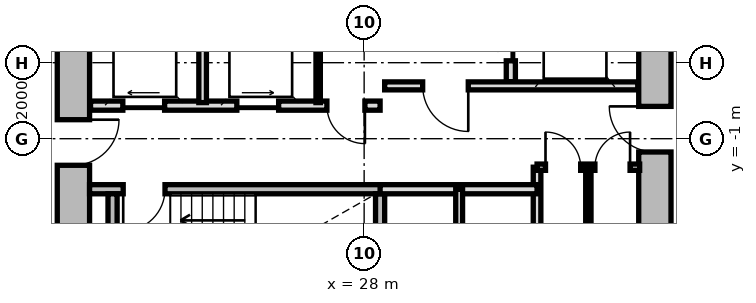
"""IFC4 building model, lengths in metres.
Left out: names, types, materials, properties, quantities, classifications, styles, units other than length and angle.
Written with IfcOpenShell. Run it as: python <this file> out.ifc"""

import sys

from ifc_helpers import new_model, si_unit, direction, frame, frame_2d, origin, place, context, subcontext, project, spatial, rectangle, extrude, source, transform, mapped, element, fill, save


model = new_model("IFC4")
c1 = context("Model", 3, precision=1e-05, world=origin(), true_north=direction((0.0, 1.0)))
c2 = subcontext(c1, "Body", "Model", "MODEL_VIEW")
j1 = project(units=[si_unit("LENGTHUNIT", "METRE"), si_unit("PLANEANGLEUNIT", "RADIAN")], contexts=[c1])
p1 = place(None, origin())
s1 = spatial("IfcSite", under=j1, at=p1, CompositionType="ELEMENT")
p2 = place(p1, origin())
s2 = spatial("IfcBuilding", under=s1, at=p2, CompositionType="ELEMENT")
p3 = place(p2, frame((0.0, 0.0, 33.8)))
s3 = spatial("IfcBuildingStorey", under=s2, at=p3, CompositionType="ELEMENT", Elevation=33.8)
m1 = source(origin(), c2, "Body", "SweptSolid", [
    extrude(rectangle(XDim=11.0, YDim=0.85, at=frame_2d((5.5, 0.0))), origin(), (0.0, 0.0, 1.0), 2.79),
])
p4 = place(p3, frame((20.35, -5.5, 0.0), z_axis=(0.0, 0.0, 1.0), x_axis=(0.0, 1.0, 0.0)))
e1 = element("IfcWall", 1, at=p4, inside=s3, PredefinedType="SHEAR", context=c2, shape_type="MappedRepresentation", body=[
    mapped(m1, transform((0.0, 0.0, 0.0), x_axis=(1.0, 0.0, 0.0), y_axis=(0.0, 1.0, 0.0), z_axis=(0.0, 0.0, 1.0), scale=1.0)),
])
p5 = place(p4, frame((3.8, 0.0, 0.0)))
e2 = element("IfcOpeningElement", 2, at=p5, cuts=e1, PredefinedType="OPENING", context=c2, shape_type="SweptSolid", body=[
    extrude(rectangle(XDim=1.2, YDim=2.15, at=frame_2d((0.6, 1.075))), frame((0.0, 0.435, 0.0), z_axis=(0.0, -1.0, 0.0), x_axis=(1.0, 0.0, 0.0)), (0.0, 0.0, 1.0), 0.87),
])
p6 = place(p3, frame((35.65, 5.5, 0.0), z_axis=(0.0, 0.0, 1.0), x_axis=(0.0, -1.0, 0.0)))
e3 = element("IfcWall", 3, at=p6, inside=s3, PredefinedType="SHEAR", context=c2, shape_type="MappedRepresentation", body=[
    mapped(m1, transform((0.0, 0.0, 0.0), x_axis=(1.0, 0.0, 0.0), y_axis=(0.0, 1.0, 0.0), z_axis=(0.0, 0.0, 1.0), scale=1.0)),
])
p7 = place(p6, frame((5.65, 0.0, 0.0)))
e4 = element("IfcOpeningElement", 4, at=p7, cuts=e3, PredefinedType="OPENING", context=c2, shape_type="SweptSolid", body=[
    extrude(rectangle(XDim=1.2, YDim=2.15, at=frame_2d((0.6, 1.075))), frame((0.0, 0.435, 0.0), z_axis=(0.0, -1.0, 0.0), x_axis=(1.0, 0.0, 0.0)), (0.0, 0.0, 1.0), 0.87),
])
m2 = source(origin(), c2, "Body", "SweptSolid", [
    extrude(rectangle(XDim=7.765, YDim=0.24, at=frame_2d((3.883, 0.0))), origin(), (0.0, 0.0, 1.0), 2.79),
])
p8 = place(p3, frame((20.775, -2.33, 0.0), z_axis=(0.0, 0.0, 1.0), x_axis=(1.0, 0.0, 0.0)))
e5 = element("IfcWall", 5, at=p8, inside=s3, PredefinedType="PARTITIONING", context=c2, shape_type="MappedRepresentation", body=[
    mapped(m2, transform((0.0, 0.0, 0.0), x_axis=(1.0, 0.0, 0.0), y_axis=(0.0, 1.0, 0.0), z_axis=(0.0, 0.0, 1.0), scale=1.0)),
])
p9 = place(p8, frame((0.885, 0.0, 0.0)))
e6 = element("IfcOpeningElement", 6, at=p9, cuts=e5, PredefinedType="OPENING", context=c2, shape_type="SweptSolid", body=[
    extrude(rectangle(XDim=1.1, YDim=2.15, at=frame_2d((0.55, 1.075))), frame((0.0, 0.13, 0.0), z_axis=(0.0, -1.0, 0.0), x_axis=(1.0, 0.0, 0.0)), (0.0, 0.0, 1.0), 0.26),
])
m3 = source(origin(), c2, "Body", "SweptSolid", [
    extrude(rectangle(XDim=3.075, YDim=0.24, at=frame_2d((1.538, 0.0))), origin(), (0.0, 0.0, 1.0), 2.79),
])
for number, where, z_axis, x_axis in (
    (7, (21.38, -5.525, 0.0), (0.0, 0.0, 1.0), (0.0, 1.0, 0.0)),
    (8, (28.42, -5.525, 0.0), (0.0, 0.0, 1.0), (0.0, 1.0, 0.0)),
):
    element("IfcWall", number, at=place(p3, frame(where, z_axis=z_axis, x_axis=x_axis)), inside=s3, PredefinedType="PARTITIONING", context=c2, shape_type="MappedRepresentation", body=[
        mapped(m3, transform((0.0, 0.0, 0.0), x_axis=(1.0, 0.0, 0.0), y_axis=(0.0, 1.0, 0.0), z_axis=(0.0, 0.0, 1.0), scale=1.0)),
    ])
m4 = source(origin(), c2, "Body", "SweptSolid", [
    extrude(rectangle(XDim=5.0, YDim=0.24, at=frame_2d((2.5, 0.0))), origin(), (0.0, 0.0, 1.0), 2.775),
])
p10 = place(p3, frame((31.86, 0.5, 0.0), z_axis=(0.0, 0.0, 1.0), x_axis=(0.0, 1.0, 0.0)))
e9 = element("IfcWall", 9, at=p10, inside=s3, PredefinedType="PARTITIONING", context=c2, shape_type="MappedRepresentation", body=[
    mapped(m4, transform((0.0, 0.0, 0.0), x_axis=(1.0, 0.0, 0.0), y_axis=(0.0, 1.0, 0.0), z_axis=(0.0, 0.0, 1.0), scale=1.0)),
])
p11 = place(p10, frame((3.05, 0.0, 0.0)))
e10 = element("IfcOpeningElement", 10, at=p11, cuts=e9, PredefinedType="OPENING", context=c2, shape_type="SweptSolid", body=[
    extrude(rectangle(XDim=1.3, YDim=2.2, at=frame_2d((0.65, 1.1))), frame((0.0, 0.13, 0.0), z_axis=(0.0, -1.0, 0.0), x_axis=(1.0, 0.0, 0.0)), (0.0, 0.0, 1.0), 0.26),
])
p12 = place(p10, frame((0.55, 0.0, 0.0)))
e11 = element("IfcOpeningElement", 11, at=p12, cuts=e9, PredefinedType="OPENING", context=c2, shape_type="SweptSolid", body=[
    extrude(rectangle(XDim=1.3, YDim=2.2, at=frame_2d((0.65, 1.1))), frame((0.0, 0.13, 0.0), z_axis=(0.0, -1.0, 0.0), x_axis=(1.0, 0.0, 0.0)), (0.0, 0.0, 1.0), 0.26),
])
m5 = source(origin(), c2, "Body", "SweptSolid", [
    extrude(rectangle(XDim=6.66, YDim=0.21, at=frame_2d((3.33, 0.0))), origin(), (0.0, 0.0, 1.0), 2.775),
])
p13 = place(p3, frame((28.54, 0.39, 0.0), z_axis=(0.0, 0.0, 1.0), x_axis=(1.0, 0.0, 0.0)))
e12 = element("IfcWall", 12, at=p13, inside=s3, PredefinedType="PARTITIONING", context=c2, shape_type="MappedRepresentation", body=[
    mapped(m5, transform((0.0, 0.0, 0.0), x_axis=(1.0, 0.0, 0.0), y_axis=(0.0, 1.0, 0.0), z_axis=(0.0, 0.0, 1.0), scale=1.0)),
])
p14 = place(p13, frame((1.0, 0.0, 0.0)))
e13 = element("IfcOpeningElement", 13, at=p14, cuts=e12, PredefinedType="OPENING", context=c2, shape_type="SweptSolid", body=[
    extrude(rectangle(XDim=1.2, YDim=2.15, at=frame_2d((0.6, 1.075))), frame((0.0, 0.115, 0.0), z_axis=(0.0, -1.0, 0.0), x_axis=(1.0, 0.0, 0.0)), (0.0, 0.0, 1.0), 0.23),
])
m6 = source(origin(), c2, "Body", "SweptSolid", [
    extrude(rectangle(XDim=7.62, YDim=0.24, at=frame_2d((3.81, 0.0))), origin(), (0.0, 0.0, 1.0), 2.775),
])
p15 = place(p3, frame((20.8, -0.13, 0.0), z_axis=(0.0, 0.0, 1.0), x_axis=(1.0, 0.0, 0.0)))
e14 = element("IfcWall", 14, at=p15, inside=s3, PredefinedType="PARTITIONING", context=c2, shape_type="MappedRepresentation", body=[
    mapped(m6, transform((0.0, 0.0, 0.0), x_axis=(1.0, 0.0, 0.0), y_axis=(0.0, 1.0, 0.0), z_axis=(0.0, 0.0, 1.0), scale=1.0)),
])
p16 = place(p15, frame((6.22, 0.0, 0.0)))
e15 = element("IfcOpeningElement", 15, at=p16, cuts=e14, PredefinedType="OPENING", context=c2, shape_type="SweptSolid", body=[
    extrude(rectangle(XDim=1.0, YDim=2.1, at=frame_2d((0.5, 1.05))), frame((0.0, 0.13, 0.0), z_axis=(0.0, -1.0, 0.0), x_axis=(1.0, 0.0, 0.0)), (0.0, 0.0, 1.0), 0.26),
])
p17 = place(p15, frame((0.85, 0.0, 0.0)))
e16 = element("IfcOpeningElement", 16, at=p17, cuts=e14, PredefinedType="OPENING", context=c2, shape_type="SweptSolid", body=[
    extrude(rectangle(XDim=1.1, YDim=2.2, at=frame_2d((0.55, 1.1))), frame((0.0, 0.13, 0.0), z_axis=(0.0, -1.0, 0.0), x_axis=(1.0, 0.0, 0.0)), (0.0, 0.0, 1.0), 0.26),
])
p18 = place(p15, frame((3.85, 0.0, 0.0)))
e17 = element("IfcOpeningElement", 17, at=p18, cuts=e14, PredefinedType="OPENING", context=c2, shape_type="SweptSolid", body=[
    extrude(rectangle(XDim=1.1, YDim=2.2, at=frame_2d((0.55, 1.1))), frame((0.0, 0.13, 0.0), z_axis=(0.0, -1.0, 0.0), x_axis=(1.0, 0.0, 0.0)), (0.0, 0.0, 1.0), 0.26),
])
m7 = source(origin(), c2, "Body", "SweptSolid", [
    extrude(rectangle(XDim=2.33, YDim=0.115, at=frame_2d((1.165, 0.0))), origin(), (0.0, 0.0, 1.0), 2.775),
])
p19 = place(p3, frame((26.79, -0.05, 0.0), z_axis=(0.0, 0.0, 1.0), x_axis=(0.0, 1.0, 0.0)))
e18 = element("IfcWall", 18, at=p19, inside=s3, PredefinedType="PARTITIONING", context=c2, shape_type="MappedRepresentation", body=[
    mapped(m7, transform((0.0, 0.0, 0.0), x_axis=(1.0, 0.0, 0.0), y_axis=(0.0, 1.0, 0.0), z_axis=(0.0, 0.0, 1.0), scale=1.0)),
])
m8 = source(origin(), c2, "Body", "SweptSolid", [
    extrude(rectangle(XDim=2.33, YDim=0.2, at=frame_2d((1.165, 0.0))), origin(), (0.0, 0.0, 1.0), 2.775),
])
p20 = place(p3, frame((23.75, -0.05, 0.0), z_axis=(0.0, 0.0, 1.0), x_axis=(0.0, 1.0, 0.0)))
e19 = element("IfcWall", 19, at=p20, inside=s3, PredefinedType="PARTITIONING", context=c2, shape_type="MappedRepresentation", body=[
    mapped(m8, transform((0.0, 0.0, 0.0), x_axis=(1.0, 0.0, 0.0), y_axis=(0.0, 1.0, 0.0), z_axis=(0.0, 0.0, 1.0), scale=1.0)),
])
m9 = source(origin(), c2, "Body", "SweptSolid", [
    extrude(rectangle(XDim=3.8, YDim=0.2, at=frame_2d((1.9, 0.0))), origin(), (0.0, 0.0, 1.0), 2.775),
])
p21 = place(p3, frame((32.55, -5.55, 0.0), z_axis=(0.0, 0.0, 1.0), x_axis=(0.0, 1.0, 0.0)))
e20 = element("IfcWall", 20, at=p21, inside=s3, PredefinedType="PARTITIONING", context=c2, shape_type="MappedRepresentation", body=[
    mapped(m9, transform((0.0, 0.0, 0.0), x_axis=(1.0, 0.0, 0.0), y_axis=(0.0, 1.0, 0.0), z_axis=(0.0, 0.0, 1.0), scale=1.0)),
])
m10 = source(origin(), c2, "Body", "SweptSolid", [
    extrude(rectangle(XDim=4.13, YDim=0.24, at=frame_2d((2.065, 0.0))), origin(), (0.0, 0.0, 1.0), 2.775),
])
p22 = place(p3, frame((28.42, -2.33, 0.0), z_axis=(0.0, 0.0, 1.0), x_axis=(1.0, 0.0, 0.0)))
e21 = element("IfcWall", 21, at=p22, inside=s3, PredefinedType="PARTITIONING", context=c2, shape_type="MappedRepresentation", body=[
    mapped(m10, transform((0.0, 0.0, 0.0), x_axis=(1.0, 0.0, 0.0), y_axis=(0.0, 1.0, 0.0), z_axis=(0.0, 0.0, 1.0), scale=1.0)),
])
m11 = source(origin(), c2, "Body", "SweptSolid", [
    extrude(rectangle(XDim=3.22, YDim=0.18, at=frame_2d((1.61, 0.0))), origin(), (0.0, 0.0, 1.0), 2.775),
])
p23 = place(p3, frame((30.5, -5.55, 0.0), z_axis=(0.0, 0.0, 1.0), x_axis=(0.0, 1.0, 0.0)))
e22 = element("IfcWall", 22, at=p23, inside=s3, PredefinedType="PARTITIONING", context=c2, shape_type="MappedRepresentation", body=[
    mapped(m11, transform((0.0, 0.0, 0.0), x_axis=(1.0, 0.0, 0.0), y_axis=(0.0, 1.0, 0.0), z_axis=(0.0, 0.0, 1.0), scale=1.0)),
])
m12 = source(origin(), c2, "Body", "SweptSolid", [
    extrude(rectangle(XDim=2.7, YDim=0.165, at=frame_2d((1.35, 0.0))), origin(), (0.0, 0.0, 1.0), 2.775),
])
p24 = place(p3, frame((32.55, -1.75, 0.0), z_axis=(0.0, 0.0, 1.0), x_axis=(1.0, 0.0, 0.0)))
e23 = element("IfcWall", 23, at=p24, inside=s3, PredefinedType="PARTITIONING", context=c2, shape_type="MappedRepresentation", body=[
    mapped(m12, transform((0.0, 0.0, 0.0), x_axis=(1.0, 0.0, 0.0), y_axis=(0.0, 1.0, 0.0), z_axis=(0.0, 0.0, 1.0), scale=1.0)),
])
p25 = place(p24, frame((0.222, 0.0, 0.0)))
e24 = element("IfcOpeningElement", 24, at=p25, cuts=e23, PredefinedType="OPENING", context=c2, shape_type="SweptSolid", body=[
    extrude(rectangle(XDim=0.925, YDim=2.1, at=frame_2d((0.462, 1.05))), frame((0.0, 0.093, 0.0), z_axis=(0.0, -1.0, 0.0), x_axis=(1.0, 0.0, 0.0)), (0.0, 0.0, 1.0), 0.185),
])
p26 = place(p24, frame((1.522, 0.0, 0.0)))
e25 = element("IfcOpeningElement", 25, at=p26, cuts=e23, PredefinedType="OPENING", context=c2, shape_type="SweptSolid", body=[
    extrude(rectangle(XDim=0.925, YDim=2.1, at=frame_2d((0.462, 1.05))), frame((0.0, 0.093, 0.0), z_axis=(0.0, -1.0, 0.0), x_axis=(1.0, 0.0, 0.0)), (0.0, 0.0, 1.0), 0.185),
])
m13 = source(origin(), c2, "Body", "SweptSolid", [
    extrude(rectangle(XDim=3.8, YDim=0.14, at=frame_2d((1.9, 0.0))), origin(), (0.0, 0.0, 1.0), 2.775),
])
p27 = place(p3, frame((33.9, -5.55, 0.0), z_axis=(0.0, 0.0, 1.0), x_axis=(0.0, 1.0, 0.0)))
e26 = element("IfcWall", 26, at=p27, inside=s3, PredefinedType="PARTITIONING", context=c2, shape_type="MappedRepresentation", body=[
    mapped(m13, transform((0.0, 0.0, 0.0), x_axis=(1.0, 0.0, 0.0), y_axis=(0.0, 1.0, 0.0), z_axis=(0.0, 0.0, 1.0), scale=1.0)),
])
m14 = source(origin(), c2, "Body", "SweptSolid", [
    extrude(rectangle(XDim=1.1, YDim=2.15, at=frame_2d((0.55, 1.075))), frame((0.0, 0.025, 0.0), z_axis=(0.0, -1.0, 0.0), x_axis=(1.0, 0.0, 0.0)), (0.0, 0.0, 1.0), 0.05),
])
p28 = place(p9, frame((1.1, 0.0, 0.0), z_axis=(0.0, 0.0, 1.0), x_axis=(-1.0, 0.0, 0.0)))
e27 = element("IfcDoor", 27, at=p28, inside=s3, OperationType="SINGLE_SWING_RIGHT", PredefinedType="DOOR", context=c2, shape_type="MappedRepresentation", body=[
    mapped(m14, transform((0.0, 0.0, 0.0), x_axis=(1.0, 0.0, 0.0), y_axis=(0.0, 1.0, 0.0), z_axis=(0.0, 0.0, 1.0), scale=1.0)),
])
fill(e6, e27)
m15 = source(origin(), c2, "Body", "SweptSolid", [
    extrude(rectangle(XDim=1.3, YDim=2.2, at=frame_2d((0.65, 1.1))), frame((0.0, 0.025, 0.0), z_axis=(0.0, -1.0, 0.0), x_axis=(1.0, 0.0, 0.0)), (0.0, 0.0, 1.0), 0.05),
])
p29 = place(p12, origin())
e28 = element("IfcDoor", 28, at=p29, inside=s3, OperationType="SLIDING_TO_RIGHT", PredefinedType="DOOR", context=c2, shape_type="MappedRepresentation", body=[
    mapped(m15, transform((0.0, 0.0, 0.0), x_axis=(1.0, 0.0, 0.0), y_axis=(0.0, 1.0, 0.0), z_axis=(0.0, 0.0, 1.0), scale=1.0)),
])
fill(e11, e28)
m16 = source(origin(), c2, "Body", "SweptSolid", [
    extrude(rectangle(XDim=1.2, YDim=2.15, at=frame_2d((0.6, 1.075))), frame((0.0, 0.025, 0.0), z_axis=(0.0, -1.0, 0.0), x_axis=(1.0, 0.0, 0.0)), (0.0, 0.0, 1.0), 0.05),
])
p30 = place(p14, frame((1.2, 0.0, 0.0), z_axis=(0.0, 0.0, 1.0), x_axis=(-1.0, 0.0, 0.0)))
e29 = element("IfcDoor", 29, at=p30, inside=s3, OperationType="SINGLE_SWING_LEFT", PredefinedType="DOOR", context=c2, shape_type="MappedRepresentation", body=[
    mapped(m16, transform((0.0, 0.0, 0.0), x_axis=(1.0, 0.0, 0.0), y_axis=(0.0, 1.0, 0.0), z_axis=(0.0, 0.0, 1.0), scale=1.0)),
])
fill(e13, e29)
p31 = place(p5, frame((1.2, 0.0, 0.0), z_axis=(0.0, 0.0, 1.0), x_axis=(-1.0, 0.0, 0.0)))
e30 = element("IfcDoor", 30, at=p31, inside=s3, OperationType="SINGLE_SWING_LEFT", PredefinedType="DOOR", context=c2, shape_type="MappedRepresentation", body=[
    mapped(m16, transform((0.0, 0.0, 0.0), x_axis=(1.0, 0.0, 0.0), y_axis=(0.0, 1.0, 0.0), z_axis=(0.0, 0.0, 1.0), scale=1.0)),
])
fill(e2, e30)
p32 = place(p7, frame((1.2, 0.0, 0.0), z_axis=(0.0, 0.0, 1.0), x_axis=(-1.0, 0.0, 0.0)))
e31 = element("IfcDoor", 31, at=p32, inside=s3, OperationType="SINGLE_SWING_RIGHT", PredefinedType="DOOR", context=c2, shape_type="MappedRepresentation", body=[
    mapped(m16, transform((0.0, 0.0, 0.0), x_axis=(1.0, 0.0, 0.0), y_axis=(0.0, 1.0, 0.0), z_axis=(0.0, 0.0, 1.0), scale=1.0)),
])
fill(e4, e31)
m17 = source(origin(), c2, "Body", "SweptSolid", [
    extrude(rectangle(XDim=1.0, YDim=2.1, at=frame_2d((0.5, 1.05))), frame((0.0, 0.025, 0.0), z_axis=(0.0, -1.0, 0.0), x_axis=(1.0, 0.0, 0.0)), (0.0, 0.0, 1.0), 0.05),
])
p33 = place(p16, frame((1.0, 0.0, 0.0), z_axis=(0.0, 0.0, 1.0), x_axis=(-1.0, 0.0, 0.0)))
e32 = element("IfcDoor", 32, at=p33, inside=s3, OperationType="SINGLE_SWING_LEFT", PredefinedType="DOOR", context=c2, shape_type="MappedRepresentation", body=[
    mapped(m17, transform((0.0, 0.0, 0.0), x_axis=(1.0, 0.0, 0.0), y_axis=(0.0, 1.0, 0.0), z_axis=(0.0, 0.0, 1.0), scale=1.0)),
])
fill(e15, e32)
m18 = source(origin(), c2, "Body", "SweptSolid", [
    extrude(rectangle(XDim=1.1, YDim=2.2, at=frame_2d((0.55, 1.1))), frame((0.0, 0.025, 0.0), z_axis=(0.0, -1.0, 0.0), x_axis=(1.0, 0.0, 0.0)), (0.0, 0.0, 1.0), 0.05),
])
p34 = place(p17, origin())
e33 = element("IfcDoor", 33, at=p34, inside=s3, OperationType="SLIDING_TO_LEFT", PredefinedType="DOOR", context=c2, shape_type="MappedRepresentation", body=[
    mapped(m18, transform((0.0, 0.0, 0.0), x_axis=(1.0, 0.0, 0.0), y_axis=(0.0, 1.0, 0.0), z_axis=(0.0, 0.0, 1.0), scale=1.0)),
])
fill(e16, e33)
p35 = place(p18, origin())
e34 = element("IfcDoor", 34, at=p35, inside=s3, OperationType="SLIDING_TO_RIGHT", PredefinedType="DOOR", context=c2, shape_type="MappedRepresentation", body=[
    mapped(m18, transform((0.0, 0.0, 0.0), x_axis=(1.0, 0.0, 0.0), y_axis=(0.0, 1.0, 0.0), z_axis=(0.0, 0.0, 1.0), scale=1.0)),
])
fill(e17, e34)
m19 = source(origin(), c2, "Body", "SweptSolid", [
    extrude(rectangle(XDim=0.925, YDim=2.1, at=frame_2d((0.462, 1.05))), frame((0.0, 0.025, 0.0), z_axis=(0.0, -1.0, 0.0), x_axis=(1.0, 0.0, 0.0)), (0.0, 0.0, 1.0), 0.05),
])
p36 = place(p25, origin())
e35 = element("IfcDoor", 35, at=p36, inside=s3, OperationType="SINGLE_SWING_LEFT", PredefinedType="DOOR", context=c2, shape_type="MappedRepresentation", body=[
    mapped(m19, transform((0.0, 0.0, 0.0), x_axis=(1.0, 0.0, 0.0), y_axis=(0.0, 1.0, 0.0), z_axis=(0.0, 0.0, 1.0), scale=1.0)),
])
fill(e24, e35)
p37 = place(p26, origin())
e36 = element("IfcDoor", 36, at=p37, inside=s3, OperationType="SINGLE_SWING_RIGHT", PredefinedType="DOOR", context=c2, shape_type="MappedRepresentation", body=[
    mapped(m19, transform((0.0, 0.0, 0.0), x_axis=(1.0, 0.0, 0.0), y_axis=(0.0, 1.0, 0.0), z_axis=(0.0, 0.0, 1.0), scale=1.0)),
])
fill(e25, e36)
save(model, sys.argv[1])
